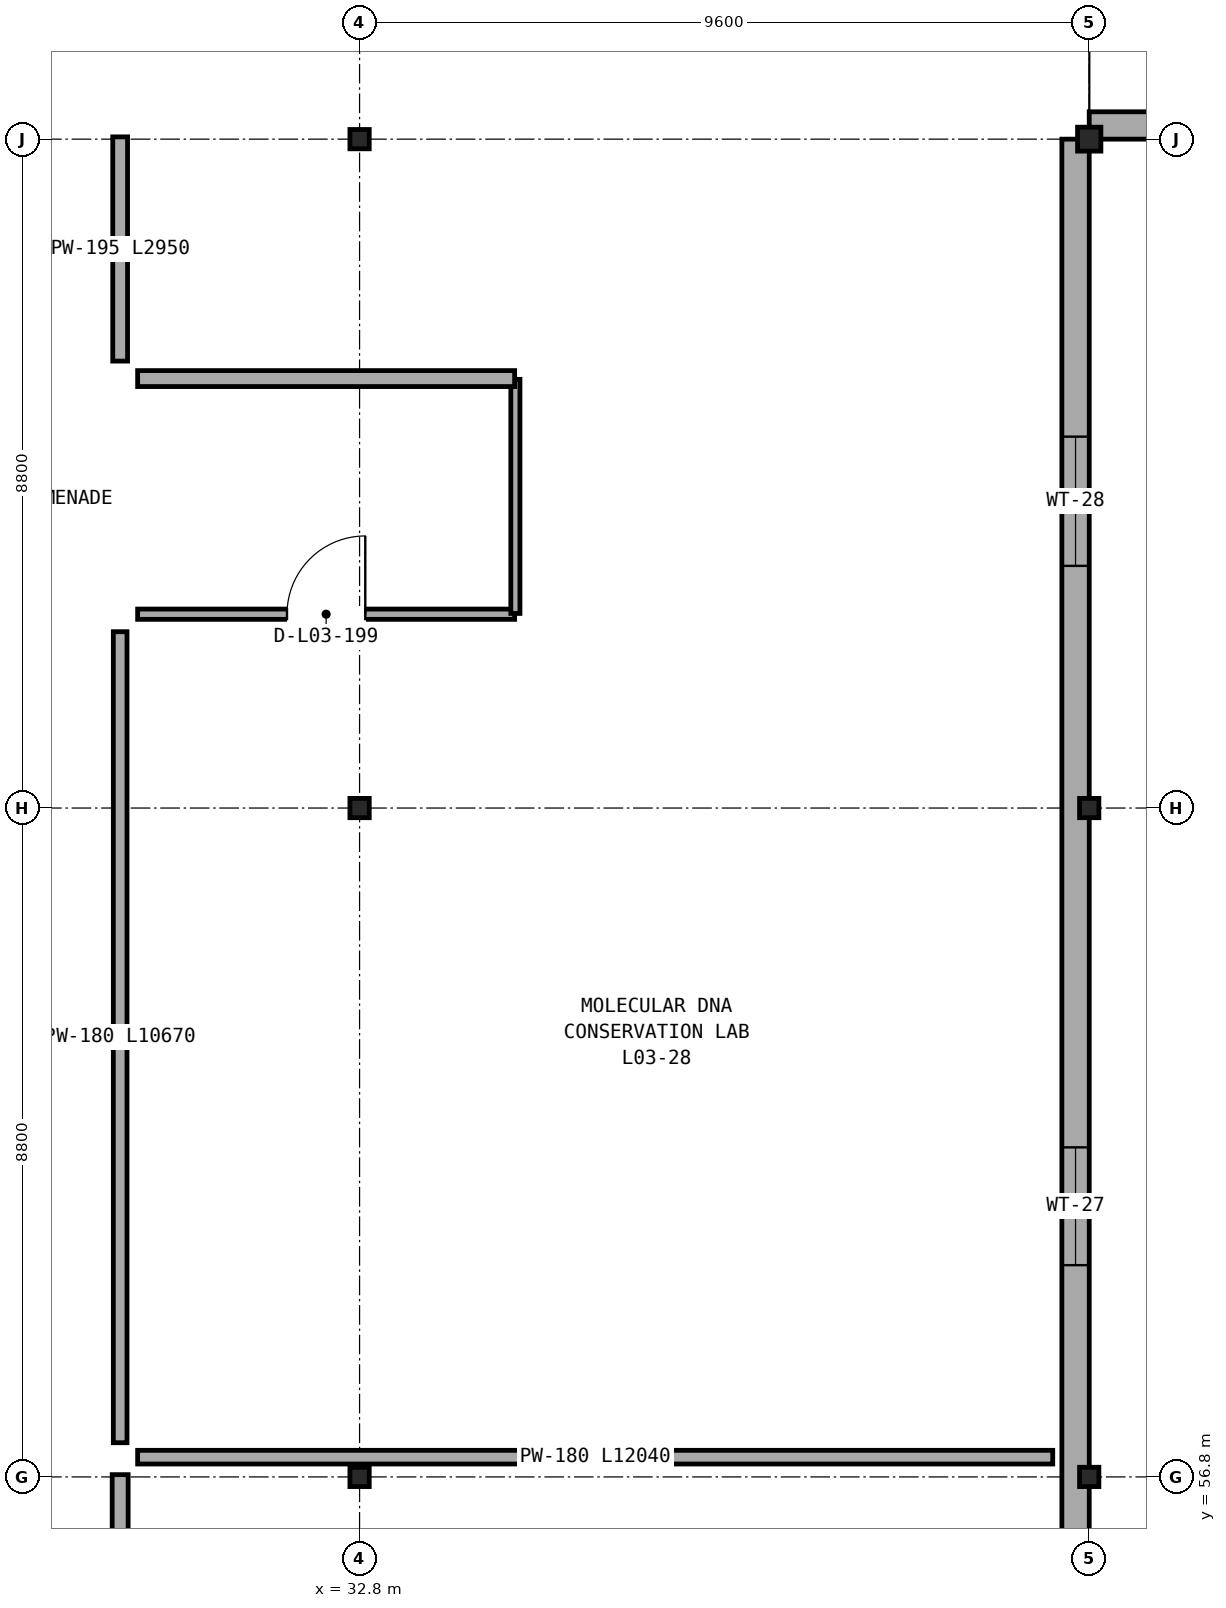
"""IFC4 building model, lengths in metres.
Left out: names, types, materials, properties, quantities, classifications, styles, units other than length and angle.
Written with IfcOpenShell. Run it as: python <this file> out.ifc"""

import sys

from ifc_helpers import new_model, si_unit, direction, frame, frame_2d, origin, origin_2d, place, context, subcontext, project, spatial, rectangle, i_section, extrude, element, fill, save


model = new_model("IFC4")
c1 = context("Model", 3, precision=1e-05, world=origin(), true_north=direction((0.0, 1.0)))
c2 = subcontext(c1, "Body", "Model", "MODEL_VIEW")
j1 = project(units=[si_unit("LENGTHUNIT", "METRE"), si_unit("PLANEANGLEUNIT", "RADIAN")], contexts=[c1])
p1 = place(None, origin())
s1 = spatial("IfcSite", under=j1, at=p1, CompositionType="ELEMENT")
p2 = place(p1, origin())
s2 = spatial("IfcBuilding", under=s1, at=p2, CompositionType="ELEMENT")
p3 = place(p2, frame((0.0, 0.0, 14.6)))
s3 = spatial("IfcBuildingStorey", under=s2, at=p3, CompositionType="ELEMENT", Elevation=14.6)
for number, where, z_axis, x_axis in (
    (1, (32.8, 56.8, 0.0), (0.0, 0.0, 1.0), (1.0, 0.0, 0.0)),
    (2, (32.8, 65.6, 0.0), (0.0, 0.0, 1.0), (1.0, 0.0, 0.0)),
    (3, (32.8, 74.4, 0.0), (0.0, 0.0, 1.0), (1.0, 0.0, 0.0)),
    (4, (42.4, 56.8, 0.0), (0.0, 0.0, 1.0), (1.0, 0.0, 0.0)),
    (5, (42.4, 65.6, 0.0), (0.0, 0.0, 1.0), (1.0, 0.0, 0.0)),
):
    element("IfcColumn", number, at=place(p3, frame(where, z_axis=z_axis, x_axis=x_axis)), inside=s3, PredefinedType="COLUMN", context=c2, shape_type="SweptSolid", body=[
        extrude(i_section(OverallWidth=0.254, OverallDepth=0.254, WebThickness=0.009, FlangeThickness=0.014, FilletRadius=0.013, at=origin_2d()), origin(), (0.0, 0.0, 1.0), 4.5),
    ])
p4 = place(p3, frame((42.4, 74.4, 0.0), z_axis=(0.0, 0.0, 1.0), x_axis=(1.0, 0.0, 0.0)))
e6 = element("IfcColumn", 6, at=p4, inside=s3, PredefinedType="COLUMN", context=c2, shape_type="SweptSolid", body=[
    extrude(i_section(OverallWidth=0.307, OverallDepth=0.315, WebThickness=0.012, FlangeThickness=0.019, FilletRadius=0.017, at=origin_2d()), origin(), (0.0, 0.0, 1.0), 4.5),
])
p5 = place(p3, frame((42.4, 74.58, 0.0), z_axis=(0.0, 0.0, 1.0), x_axis=(1.0, 0.0, 0.0)))
e7 = element("IfcWall", 7, at=p5, inside=s3, PredefinedType="SOLIDWALL", context=c2, shape_type="SweptSolid", body=[
    extrude(rectangle(XDim=38.4, YDim=0.36, at=frame_2d((19.2, 0.0))), origin(), (0.0, 0.0, 1.0), 3.662),
])
p6 = place(p5, frame((1.8, 0.0, 0.9)))
e8 = element("IfcOpeningElement", 8, at=p6, cuts=e7, PredefinedType="OPENING", context=c2, shape_type="SweptSolid", body=[
    extrude(rectangle(XDim=1.25, YDim=1.55, at=frame_2d((0.625, 0.775))), frame((0.0, 0.19, 0.0), z_axis=(0.0, -1.0, 0.0), x_axis=(1.0, 0.0, 0.0)), (0.0, 0.0, 1.0), 0.38),
])
p7 = place(p5, frame((6.4, 0.0, 0.9)))
e9 = element("IfcOpeningElement", 9, at=p7, cuts=e7, PredefinedType="OPENING", context=c2, shape_type="SweptSolid", body=[
    extrude(rectangle(XDim=1.52, YDim=1.55, at=frame_2d((0.76, 0.775))), frame((0.0, 0.19, 0.0), z_axis=(0.0, -1.0, 0.0), x_axis=(1.0, 0.0, 0.0)), (0.0, 0.0, 1.0), 0.38),
])
p8 = place(p5, frame((11.0, 0.0, 0.9)))
e10 = element("IfcOpeningElement", 10, at=p8, cuts=e7, PredefinedType="OPENING", context=c2, shape_type="SweptSolid", body=[
    extrude(rectangle(XDim=1.55, YDim=1.55, at=frame_2d((0.775, 0.775))), frame((0.0, 0.19, 0.0), z_axis=(0.0, -1.0, 0.0), x_axis=(1.0, 0.0, 0.0)), (0.0, 0.0, 1.0), 0.38),
])
p9 = place(p5, frame((15.6, 0.0, 0.9)))
e11 = element("IfcOpeningElement", 11, at=p9, cuts=e7, PredefinedType="OPENING", context=c2, shape_type="SweptSolid", body=[
    extrude(rectangle(XDim=1.82, YDim=1.55, at=frame_2d((0.91, 0.775))), frame((0.0, 0.19, 0.0), z_axis=(0.0, -1.0, 0.0), x_axis=(1.0, 0.0, 0.0)), (0.0, 0.0, 1.0), 0.38),
])
p10 = place(p5, frame((20.2, 0.0, 0.9)))
e12 = element("IfcOpeningElement", 12, at=p10, cuts=e7, PredefinedType="OPENING", context=c2, shape_type="SweptSolid", body=[
    extrude(rectangle(XDim=1.85, YDim=1.55, at=frame_2d((0.925, 0.775))), frame((0.0, 0.19, 0.0), z_axis=(0.0, -1.0, 0.0), x_axis=(1.0, 0.0, 0.0)), (0.0, 0.0, 1.0), 0.38),
])
p11 = place(p5, frame((24.8, 0.0, 0.9)))
e13 = element("IfcOpeningElement", 13, at=p11, cuts=e7, PredefinedType="OPENING", context=c2, shape_type="SweptSolid", body=[
    extrude(rectangle(XDim=2.0, YDim=1.55, at=frame_2d((1.0, 0.775))), frame((0.0, 0.19, 0.0), z_axis=(0.0, -1.0, 0.0), x_axis=(1.0, 0.0, 0.0)), (0.0, 0.0, 1.0), 0.38),
])
p12 = place(p3, frame((42.22, 39.386, 0.0), z_axis=(0.0, 0.0, 1.0), x_axis=(0.0, 1.0, 0.0)))
e14 = element("IfcWall", 14, at=p12, inside=s3, PredefinedType="SOLIDWALL", context=c2, shape_type="SweptSolid", body=[
    extrude(rectangle(XDim=35.014, YDim=0.36, at=frame_2d((17.507, 0.0))), origin(), (0.0, 0.0, 1.0), 3.702),
])
p13 = place(p12, frame((1.8, 0.0, 0.9)))
e15 = element("IfcOpeningElement", 15, at=p13, cuts=e14, PredefinedType="OPENING", context=c2, shape_type="SweptSolid", body=[
    extrude(rectangle(XDim=1.1, YDim=2.15, at=frame_2d((0.55, 1.075))), frame((0.0, 0.19, 0.0), z_axis=(0.0, -1.0, 0.0), x_axis=(1.0, 0.0, 0.0)), (0.0, 0.0, 1.0), 0.38),
])
p14 = place(p12, frame((6.4, 0.0, 0.9)))
e16 = element("IfcOpeningElement", 16, at=p14, cuts=e14, PredefinedType="OPENING", context=c2, shape_type="SweptSolid", body=[
    extrude(rectangle(XDim=1.25, YDim=2.15, at=frame_2d((0.625, 1.075))), frame((0.0, 0.19, 0.0), z_axis=(0.0, -1.0, 0.0), x_axis=(1.0, 0.0, 0.0)), (0.0, 0.0, 1.0), 0.38),
])
p15 = place(p12, frame((11.0, 0.0, 0.9)))
e17 = element("IfcOpeningElement", 17, at=p15, cuts=e14, PredefinedType="OPENING", context=c2, shape_type="SweptSolid", body=[
    extrude(rectangle(XDim=1.4, YDim=2.15, at=frame_2d((0.7, 1.075))), frame((0.0, 0.19, 0.0), z_axis=(0.0, -1.0, 0.0), x_axis=(1.0, 0.0, 0.0)), (0.0, 0.0, 1.0), 0.38),
])
p16 = place(p12, frame((20.2, 0.0, 0.9)))
e18 = element("IfcOpeningElement", 18, at=p16, cuts=e14, PredefinedType="OPENING", context=c2, shape_type="SweptSolid", body=[
    extrude(rectangle(XDim=1.55, YDim=2.15, at=frame_2d((0.775, 1.075))), frame((0.0, 0.19, 0.0), z_axis=(0.0, -1.0, 0.0), x_axis=(1.0, 0.0, 0.0)), (0.0, 0.0, 1.0), 0.38),
])
p17 = place(p12, frame((29.4, 0.0, 0.9)))
e19 = element("IfcOpeningElement", 19, at=p17, cuts=e14, PredefinedType="OPENING", context=c2, shape_type="SweptSolid", body=[
    extrude(rectangle(XDim=1.7, YDim=2.15, at=frame_2d((0.85, 1.075))), frame((0.0, 0.19, 0.0), z_axis=(0.0, -1.0, 0.0), x_axis=(1.0, 0.0, 0.0)), (0.0, 0.0, 1.0), 0.38),
])
p18 = place(p3, frame((29.65, 54.48, 0.0), z_axis=(0.0, 0.0, 1.0), x_axis=(0.0, 1.0, 0.0)))
e20 = element("IfcWall", 20, at=p18, inside=s3, PredefinedType="PARTITIONING", context=c2, shape_type="SweptSolid", body=[
    extrude(rectangle(XDim=2.35, YDim=0.21, at=frame_2d((1.175, 0.0))), origin(), (0.0, 0.0, 1.0), 3.42),
])
p19 = place(p3, frame((29.88, 68.15, 0.0), z_axis=(0.0, 0.0, 1.0), x_axis=(1.0, 0.0, 0.0)))
e21 = element("IfcWall", 21, at=p19, inside=s3, PredefinedType="PARTITIONING", context=c2, shape_type="SweptSolid", body=[
    extrude(rectangle(XDim=4.96, YDim=0.135, at=frame_2d((2.48, 0.0))), origin(), (0.0, 0.0, 1.0), 3.763),
])
p20 = place(p19, frame((1.965, 0.0, 0.0)))
e22 = element("IfcOpeningElement", 22, at=p20, cuts=e21, PredefinedType="OPENING", context=c2, shape_type="SweptSolid", body=[
    extrude(rectangle(XDim=1.03, YDim=2.16, at=frame_2d((0.515, 1.08))), frame((0.0, 0.078, 0.0), z_axis=(0.0, -1.0, 0.0), x_axis=(1.0, 0.0, 0.0)), (0.0, 0.0, 1.0), 0.155),
])
p21 = place(p3, frame((34.85, 68.16, 0.0), z_axis=(0.0, 0.0, 1.0), x_axis=(0.0, 1.0, 0.0)))
e23 = element("IfcWall", 23, at=p21, inside=s3, PredefinedType="PARTITIONING", context=c2, shape_type="SweptSolid", body=[
    extrude(rectangle(XDim=3.08, YDim=0.12, at=frame_2d((1.54, 0.0))), origin(), (0.0, 0.0, 1.0), 4.13),
])
p22 = place(p3, frame((34.84, 71.25, 0.0), z_axis=(0.0, 0.0, 1.0), x_axis=(-1.0, 0.0, 0.0)))
e24 = element("IfcWall", 24, at=p22, inside=s3, PredefinedType="PARTITIONING", context=c2, shape_type="SweptSolid", body=[
    extrude(rectangle(XDim=4.96, YDim=0.21, at=frame_2d((2.48, 0.0))), origin(), (0.0, 0.0, 1.0), 3.763),
])
p23 = place(p3, frame((29.65, 71.48, 0.0), z_axis=(0.0, 0.0, 1.0), x_axis=(0.0, 1.0, 0.0)))
e25 = element("IfcWall", 25, at=p23, inside=s3, PredefinedType="PARTITIONING", context=c2, shape_type="SweptSolid", body=[
    extrude(rectangle(XDim=2.95, YDim=0.195, at=frame_2d((1.475, 0.0))), origin(), (0.0, 0.0, 1.0), 3.42),
])
p24 = place(p3, frame((29.65, 57.25, 0.0), z_axis=(0.0, 0.0, 1.0), x_axis=(0.0, 1.0, 0.0)))
e26 = element("IfcWall", 26, at=p24, inside=s3, PredefinedType="PARTITIONING", context=c2, shape_type="SweptSolid", body=[
    extrude(rectangle(XDim=10.67, YDim=0.18, at=frame_2d((5.335, 0.0))), origin(), (0.0, 0.0, 1.0), 3.42),
])
p25 = place(p3, frame((29.88, 57.06, 0.0), z_axis=(0.0, 0.0, 1.0), x_axis=(1.0, 0.0, 0.0)))
e27 = element("IfcWall", 27, at=p25, inside=s3, PredefinedType="PARTITIONING", context=c2, shape_type="SweptSolid", body=[
    extrude(rectangle(XDim=12.04, YDim=0.18, at=frame_2d((6.02, 0.0))), origin(), (0.0, 0.0, 1.0), 3.42),
])
p26 = place(p16, origin())
e28 = element("IfcWindow", 28, at=p26, inside=s3, PartitioningType="SINGLE_PANEL", PredefinedType="WINDOW", context=c2, shape_type="SweptSolid", body=[
    extrude(rectangle(XDim=1.55, YDim=2.15, at=frame_2d((0.775, 1.075))), frame((0.0, 0.03, 0.0), z_axis=(0.0, -1.0, 0.0), x_axis=(1.0, 0.0, 0.0)), (0.0, 0.0, 1.0), 0.06),
])
fill(e18, e28)
p27 = place(p17, origin())
e29 = element("IfcWindow", 29, at=p27, inside=s3, PartitioningType="SINGLE_PANEL", PredefinedType="WINDOW", context=c2, shape_type="SweptSolid", body=[
    extrude(rectangle(XDim=1.7, YDim=2.15, at=frame_2d((0.85, 1.075))), frame((0.0, 0.03, 0.0), z_axis=(0.0, -1.0, 0.0), x_axis=(1.0, 0.0, 0.0)), (0.0, 0.0, 1.0), 0.06),
])
fill(e19, e29)
p28 = place(p20, origin())
e30 = element("IfcDoor", 30, at=p28, inside=s3, OperationType="SINGLE_SWING_RIGHT", PredefinedType="DOOR", context=c2, shape_type="SweptSolid", body=[
    extrude(rectangle(XDim=1.03, YDim=2.16, at=frame_2d((0.515, 1.08))), frame((0.0, 0.025, 0.0), z_axis=(0.0, -1.0, 0.0), x_axis=(1.0, 0.0, 0.0)), (0.0, 0.0, 1.0), 0.05),
])
fill(e22, e30)
save(model, sys.argv[1])
